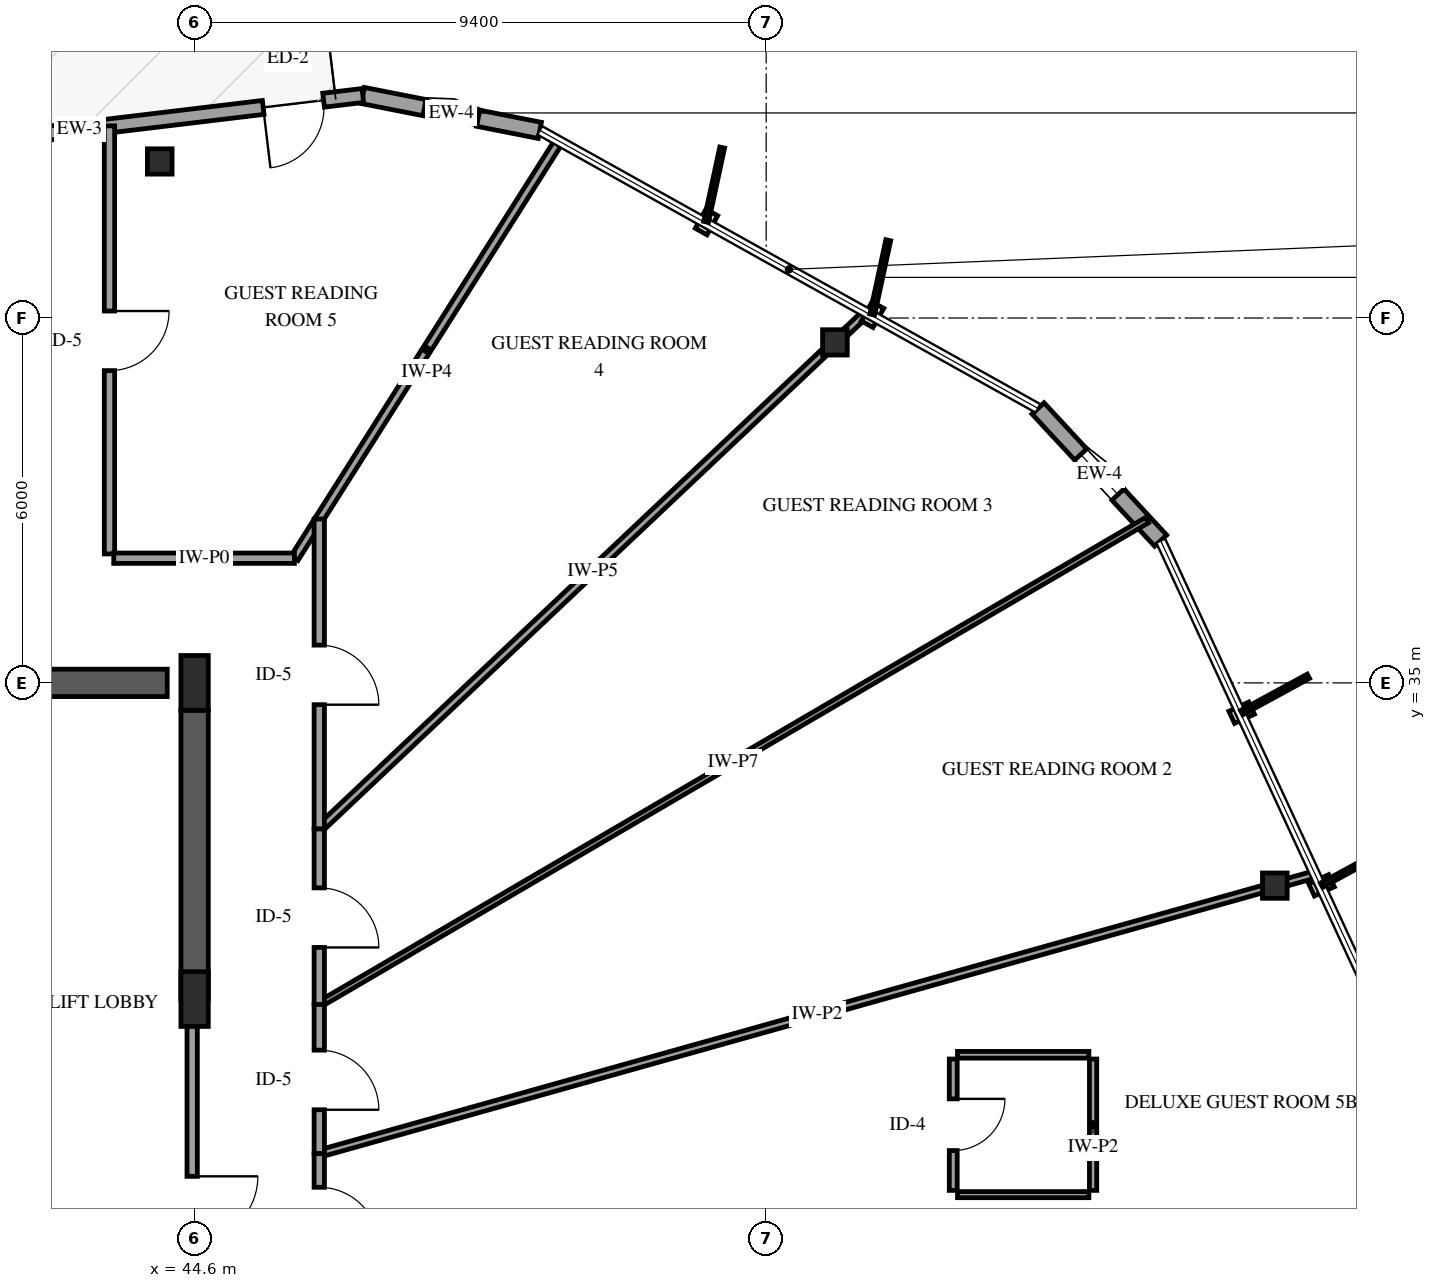
"""IFC4 building model, lengths in metres.
Left out: names, types, materials, properties, quantities, classifications, styles, units other than length and angle.
Written with IfcOpenShell. Run it as: python <this file> out.ifc"""

import sys

from ifc_helpers import new_model, si_unit, direction, frame, frame_2d, origin, origin_2d, place, context, subcontext, project, spatial, rectangle, i_section, extrude, element, fill, save


model = new_model("IFC4")
c1 = context("Model", 3, precision=1e-05, world=origin(), true_north=direction((0.0, 1.0)))
c2 = subcontext(c1, "Body", "Model", "MODEL_VIEW")
j1 = project(units=[si_unit("LENGTHUNIT", "METRE"), si_unit("PLANEANGLEUNIT", "RADIAN")], contexts=[c1])
p1 = place(None, origin())
s1 = spatial("IfcSite", under=j1, at=p1, CompositionType="ELEMENT")
p2 = place(p1, origin())
s2 = spatial("IfcBuilding", under=s1, at=p2, CompositionType="ELEMENT")
p3 = place(p2, frame((0.0, 0.0, 190.6)))
s3 = spatial("IfcBuildingStorey", under=s2, at=p3, CompositionType="ELEMENT", Elevation=190.6)
p4 = place(p3, frame((41.3, 35.0, 0.0), z_axis=(0.0, 0.0, 1.0), x_axis=(1.0, 0.0, 0.0)))
e1 = element("IfcWall", 1, at=p4, inside=s3, PredefinedType="SHEAR", context=c2, shape_type="SweptSolid", body=[
    extrude(rectangle(XDim=2.85, YDim=0.45, at=frame_2d((1.425, 0.0))), origin(), (0.0, 0.0, 1.0), 3.6),
])
p5 = place(p3, frame((44.6, 29.8, 0.0), z_axis=(0.0, 0.0, 1.0), x_axis=(0.0, 1.0, 0.0)))
e2 = element("IfcWall", 2, at=p5, inside=s3, PredefinedType="SHEAR", context=c2, shape_type="SweptSolid", body=[
    extrude(rectangle(XDim=4.75, YDim=0.45, at=frame_2d((2.375, 0.0))), origin(), (0.0, 0.0, 1.0), 3.6),
])
for number, where, z_axis, x_axis in (
    (3, (44.6, 29.8, -0.3), (0.0, 0.0, 1.0), (1.0, 0.0, 0.0)),
    (4, (44.6, 35.0, -0.3), (0.0, 0.0, 1.0), (1.0, 0.0, 0.0)),
):
    element("IfcColumn", number, at=place(p3, frame(where, z_axis=z_axis, x_axis=x_axis)), inside=s3, PredefinedType="PILASTER", context=c2, shape_type="SweptSolid", body=[
        extrude(rectangle(XDim=0.45, YDim=0.9, at=origin_2d()), origin(), (0.0, 0.0, 1.0), 3.9),
    ])
for number, where, z_axis, x_axis in (
    (5, (62.365, 31.666, -0.3), (0.0, 0.0, 1.0), (1.0, 0.0, 0.0)),
    (6, (55.13, 40.599, -0.3), (0.0, 0.0, 1.0), (1.0, 0.0, 0.0)),
    (7, (44.027, 43.574, -0.3), (0.0, 0.0, 1.0), (1.0, 0.0, 0.0)),
):
    element("IfcColumn", number, at=place(p3, frame(where, z_axis=z_axis, x_axis=x_axis)), inside=s3, PredefinedType="COLUMN", context=c2, shape_type="SweptSolid", body=[
        extrude(i_section(OverallWidth=0.406, OverallDepth=0.416, WebThickness=0.03, FlangeThickness=0.048, FilletRadius=0.038, at=origin_2d()), origin(), (0.0, 0.0, 1.0), 3.9),
    ])
p6 = place(p3, frame((50.277, 44.085, 0.0), z_axis=(0.0, 0.0, 1.0), x_axis=(-0.981090069254, 0.193551739883, 0.0)))
e8 = element("IfcWall", 8, at=p6, inside=s3, PredefinedType="SOLIDWALL", context=c2, shape_type="SweptSolid", body=[
    extrude(rectangle(XDim=2.967, YDim=0.27, at=frame_2d((1.483, 0.0))), origin(), (0.0, 0.0, 1.0), 2.679),
])
p7 = place(p6, frame((1.033, 0.0, 0.75)))
e9 = element("IfcOpeningElement", 9, at=p7, cuts=e8, PredefinedType="OPENING", context=c2, shape_type="SweptSolid", body=[
    extrude(rectangle(XDim=0.9, YDim=1.5, at=frame_2d((0.45, 0.75))), frame((0.0, 0.145, 0.0), z_axis=(0.0, -1.0, 0.0), x_axis=(1.0, 0.0, 0.0)), (0.0, 0.0, 1.0), 0.29),
])
p8 = place(p3, frame((47.366, 44.659, 0.0), z_axis=(0.0, 0.0, 1.0), x_axis=(-0.992882132133, -0.119101098615, 0.0)))
e10 = element("IfcWall", 10, at=p8, inside=s3, PredefinedType="SOLIDWALL", context=c2, shape_type="SweptSolid", body=[
    extrude(rectangle(XDim=9.382, YDim=0.23, at=frame_2d((4.691, 0.0))), origin(), (0.0, 0.0, 1.0), 2.679),
])
p9 = place(p8, frame((0.65, 0.0, 0.0)))
e11 = element("IfcOpeningElement", 11, at=p9, cuts=e10, PredefinedType="OPENING", context=c2, shape_type="SweptSolid", body=[
    extrude(rectangle(XDim=1.0, YDim=2.15, at=frame_2d((0.5, 1.075))), frame((0.0, 0.125, 0.0), z_axis=(0.0, -1.0, 0.0), x_axis=(1.0, 0.0, 0.0)), (0.0, 0.0, 1.0), 0.25),
])
p10 = place(p8, frame((6.583, 0.0, 0.72)))
e12 = element("IfcOpeningElement", 12, at=p10, cuts=e10, PredefinedType="OPENING", context=c2, shape_type="SweptSolid", body=[
    extrude(rectangle(XDim=1.5, YDim=1.7, at=frame_2d((0.75, 0.85))), frame((0.0, 0.125, 0.0), z_axis=(0.0, -1.0, 0.0), x_axis=(1.0, 0.0, 0.0)), (0.0, 0.0, 1.0), 0.25),
])
p11 = place(p3, frame((60.487, 37.339, 0.0), z_axis=(0.0, 0.0, 1.0), x_axis=(-0.679939563614, 0.733268156838, 0.0)))
e13 = element("IfcWall", 13, at=p11, inside=s3, PredefinedType="SOLIDWALL", context=c2, shape_type="SweptSolid", body=[
    extrude(rectangle(XDim=2.967, YDim=0.27, at=frame_2d((1.483, 0.0))), origin(), (0.0, 0.0, 1.0), 2.679),
])
p12 = place(p11, frame((1.033, 0.0, 0.75)))
e14 = element("IfcOpeningElement", 14, at=p12, cuts=e13, PredefinedType="OPENING", context=c2, shape_type="SweptSolid", body=[
    extrude(rectangle(XDim=0.9, YDim=1.5, at=frame_2d((0.45, 0.75))), frame((0.0, 0.145, 0.0), z_axis=(0.0, -1.0, 0.0), x_axis=(1.0, 0.0, 0.0)), (0.0, 0.0, 1.0), 0.29),
])
p13 = place(p3, frame((46.65, 27.258, 0.0), z_axis=(0.0, 0.0, 1.0), x_axis=(0.962850938161, 0.270033462525, 0.0)))
e15 = element("IfcWall", 15, at=p13, inside=s3, PredefinedType="PARTITIONING", context=c2, shape_type="SweptSolid", body=[
    extrude(rectangle(XDim=17.009, YDim=0.12, at=frame_2d((8.504, 0.0))), origin(), (0.0, 0.0, 1.0), 3.3),
])
p14 = place(p3, frame((46.65, 29.711, 0.0), z_axis=(0.0, 0.0, 1.0), x_axis=(0.863122930512, 0.504993868106, 0.0)))
e16 = element("IfcWall", 16, at=p14, inside=s3, PredefinedType="PARTITIONING", context=c2, shape_type="SweptSolid", body=[
    extrude(rectangle(XDim=15.771, YDim=0.1, at=frame_2d((7.885, 0.0))), origin(), (0.0, 0.0, 1.0), 2.678),
])
p15 = place(p3, frame((46.65, 32.597, 0.0), z_axis=(0.0, 0.0, 1.0), x_axis=(0.727340314182, 0.686276961121, 0.0)))
e17 = element("IfcWall", 17, at=p15, inside=s3, PredefinedType="PARTITIONING", context=c2, shape_type="SweptSolid", body=[
    extrude(rectangle(XDim=12.373, YDim=0.13, at=frame_2d((6.186, 0.0))), origin(), (0.0, 0.0, 1.0), 2.595),
])
p16 = place(p3, frame((46.241, 37.05, 0.0), z_axis=(0.0, 0.0, 1.0), x_axis=(0.535676911854, 0.844423025566, 0.0)))
e18 = element("IfcWall", 18, at=p16, inside=s3, PredefinedType="PARTITIONING", context=c2, shape_type="SweptSolid", body=[
    extrude(rectangle(XDim=8.123, YDim=0.14, at=frame_2d((4.061, 0.0))), origin(), (0.0, 0.0, 1.0), 3.3),
])
p17 = place(p3, frame((43.2, 44.16, 0.0), z_axis=(0.0, 0.0, 1.0), x_axis=(0.0, -1.0, 0.0)))
e19 = element("IfcWall", 19, at=p17, inside=s3, PredefinedType="PARTITIONING", context=c2, shape_type="SweptSolid", body=[
    extrude(rectangle(XDim=7.04, YDim=0.17, at=frame_2d((3.52, 0.0))), origin(), (0.0, 0.0, 1.0), 2.595),
])
p18 = place(p17, frame((3.045, 0.0, 0.0)))
e20 = element("IfcOpeningElement", 20, at=p18, cuts=e19, PredefinedType="OPENING", context=c2, shape_type="SweptSolid", body=[
    extrude(rectangle(XDim=0.98, YDim=2.15, at=frame_2d((0.49, 1.075))), frame((0.0, 0.095, 0.0), z_axis=(0.0, -1.0, 0.0), x_axis=(1.0, 0.0, 0.0)), (0.0, 0.0, 1.0), 0.19),
])
p19 = place(p3, frame((44.56, 29.8, 0.0), z_axis=(0.0, 0.0, 1.0), x_axis=(0.0, -1.0, 0.0)))
e21 = element("IfcWall", 21, at=p19, inside=s3, PredefinedType="PARTITIONING", context=c2, shape_type="SweptSolid", body=[
    extrude(rectangle(XDim=6.91, YDim=0.17, at=frame_2d((3.455, 0.0))), origin(), (0.0, 0.0, 1.0), 2.34),
])
p20 = place(p19, frame((2.915, 0.0, 0.0)))
e22 = element("IfcOpeningElement", 22, at=p20, cuts=e21, PredefinedType="OPENING", context=c2, shape_type="SweptSolid", body=[
    extrude(rectangle(XDim=1.08, YDim=2.15, at=frame_2d((0.54, 1.075))), frame((0.0, 0.095, 0.0), z_axis=(0.0, -1.0, 0.0), x_axis=(1.0, 0.0, 0.0)), (0.0, 0.0, 1.0), 0.19),
])
p21 = place(p3, frame((46.65, 37.695, 0.0), z_axis=(0.0, 0.0, 1.0), x_axis=(0.0, -1.0, 0.0)))
e23 = element("IfcWall", 23, at=p21, inside=s3, PredefinedType="PARTITIONING", context=c2, shape_type="SweptSolid", body=[
    extrude(rectangle(XDim=5.098, YDim=0.17, at=frame_2d((2.549, 0.0))), origin(), (0.0, 0.0, 1.0), 3.3),
])
p22 = place(p21, frame((2.074, 0.0, 0.0)))
e24 = element("IfcOpeningElement", 24, at=p22, cuts=e23, PredefinedType="OPENING", context=c2, shape_type="SweptSolid", body=[
    extrude(rectangle(XDim=0.98, YDim=2.15, at=frame_2d((0.49, 1.075))), frame((0.0, 0.095, 0.0), z_axis=(0.0, -1.0, 0.0), x_axis=(1.0, 0.0, 0.0)), (0.0, 0.0, 1.0), 0.19),
])
p23 = place(p3, frame((43.27, 37.05, 0.0), z_axis=(0.0, 0.0, 1.0), x_axis=(1.0, 0.0, 0.0)))
e25 = element("IfcWall", 25, at=p23, inside=s3, PredefinedType="PARTITIONING", context=c2, shape_type="SweptSolid", body=[
    extrude(rectangle(XDim=2.971, YDim=0.17, at=frame_2d((1.485, 0.0))), origin(), (0.0, 0.0, 1.0), 3.3),
])
p24 = place(p3, frame((46.65, 32.597, 0.0), z_axis=(0.0, 0.0, 1.0), x_axis=(0.0, -1.0, 0.0)))
e26 = element("IfcWall", 26, at=p24, inside=s3, PredefinedType="PARTITIONING", context=c2, shape_type="SweptSolid", body=[
    extrude(rectangle(XDim=2.886, YDim=0.17, at=frame_2d((1.443, 0.0))), origin(), (0.0, 0.0, 1.0), 3.3),
])
p25 = place(p24, frame((0.968, 0.0, 0.0)))
e27 = element("IfcOpeningElement", 27, at=p25, cuts=e26, PredefinedType="OPENING", context=c2, shape_type="SweptSolid", body=[
    extrude(rectangle(XDim=0.98, YDim=2.15, at=frame_2d((0.49, 1.075))), frame((0.0, 0.095, 0.0), z_axis=(0.0, -1.0, 0.0), x_axis=(1.0, 0.0, 0.0)), (0.0, 0.0, 1.0), 0.19),
])
p26 = place(p3, frame((46.65, 29.711, 0.0), z_axis=(0.0, 0.0, 1.0), x_axis=(0.0, -1.0, 0.0)))
e28 = element("IfcWall", 28, at=p26, inside=s3, PredefinedType="PARTITIONING", context=c2, shape_type="SweptSolid", body=[
    extrude(rectangle(XDim=2.453, YDim=0.17, at=frame_2d((1.227, 0.0))), origin(), (0.0, 0.0, 1.0), 3.3),
])
p27 = place(p26, frame((0.751, 0.0, 0.0)))
e29 = element("IfcOpeningElement", 29, at=p27, cuts=e28, PredefinedType="OPENING", context=c2, shape_type="SweptSolid", body=[
    extrude(rectangle(XDim=0.98, YDim=2.15, at=frame_2d((0.49, 1.075))), frame((0.0, 0.095, 0.0), z_axis=(0.0, -1.0, 0.0), x_axis=(1.0, 0.0, 0.0)), (0.0, 0.0, 1.0), 0.19),
])
p28 = place(p3, frame((57.076, 28.814, 0.0), z_axis=(0.0, 0.0, 1.0), x_axis=(0.0, -1.0, 0.0)))
e30 = element("IfcWall", 30, at=p28, inside=s3, PredefinedType="PARTITIONING", context=c2, shape_type="SweptSolid", body=[
    extrude(rectangle(XDim=2.16, YDim=0.13, at=frame_2d((1.08, 0.0))), origin(), (0.0, 0.0, 1.0), 3.3),
])
p29 = place(p28, frame((0.655, 0.0, 0.0)))
e31 = element("IfcOpeningElement", 31, at=p29, cuts=e30, PredefinedType="OPENING", context=c2, shape_type="SweptSolid", body=[
    extrude(rectangle(XDim=0.85, YDim=2.1, at=frame_2d((0.425, 1.05))), frame((0.0, 0.075, 0.0), z_axis=(0.0, -1.0, 0.0), x_axis=(1.0, 0.0, 0.0)), (0.0, 0.0, 1.0), 0.15),
])
p30 = place(p3, frame((59.376, 26.654, 0.0), z_axis=(0.0, 0.0, 1.0), x_axis=(0.0, 1.0, 0.0)))
e32 = element("IfcWall", 32, at=p30, inside=s3, PredefinedType="PARTITIONING", context=c2, shape_type="SweptSolid", body=[
    extrude(rectangle(XDim=2.16, YDim=0.12, at=frame_2d((1.08, 0.0))), origin(), (0.0, 0.0, 1.0), 3.3),
])
p31 = place(p3, frame((59.306, 28.884, 0.0), z_axis=(0.0, 0.0, 1.0), x_axis=(-1.0, 0.0, 0.0)))
e33 = element("IfcWall", 33, at=p31, inside=s3, PredefinedType="PARTITIONING", context=c2, shape_type="SweptSolid", body=[
    extrude(rectangle(XDim=2.16, YDim=0.11, at=frame_2d((1.08, 0.0))), origin(), (0.0, 0.0, 1.0), 3.3),
])
p32 = place(p3, frame((57.146, 26.584, 0.0), z_axis=(0.0, 0.0, 1.0), x_axis=(1.0, 0.0, 0.0)))
e34 = element("IfcWall", 34, at=p32, inside=s3, PredefinedType="PARTITIONING", context=c2, shape_type="SweptSolid", body=[
    extrude(rectangle(XDim=2.16, YDim=0.1, at=frame_2d((1.08, 0.0))), origin(), (0.0, 0.0, 1.0), 3.3),
])
p33 = place(p3, frame((46.65, 27.258, 0.0), z_axis=(0.0, 0.0, 1.0), x_axis=(0.0, -1.0, 0.0)))
e35 = element("IfcWall", 35, at=p33, inside=s3, PredefinedType="PARTITIONING", context=c2, shape_type="SweptSolid", body=[
    extrude(rectangle(XDim=2.056, YDim=0.17, at=frame_2d((1.028, 0.0))), origin(), (0.0, 0.0, 1.0), 3.3),
])
p34 = place(p33, frame((0.553, 0.0, 0.0)))
e36 = element("IfcOpeningElement", 36, at=p34, cuts=e35, PredefinedType="OPENING", context=c2, shape_type="SweptSolid", body=[
    extrude(rectangle(XDim=0.98, YDim=2.15, at=frame_2d((0.49, 1.075))), frame((0.0, 0.095, 0.0), z_axis=(0.0, -1.0, 0.0), x_axis=(1.0, 0.0, 0.0)), (0.0, 0.0, 1.0), 0.19),
])
p35 = place(p7, origin())
e37 = element("IfcWindow", 37, at=p35, inside=s3, PartitioningType="SINGLE_PANEL", PredefinedType="WINDOW", context=c2, shape_type="SweptSolid", body=[
    extrude(rectangle(XDim=0.9, YDim=1.5, at=frame_2d((0.45, 0.75))), frame((0.0, 0.03, 0.0), z_axis=(0.0, -1.0, 0.0), x_axis=(1.0, 0.0, 0.0)), (0.0, 0.0, 1.0), 0.06),
])
fill(e9, e37)
p36 = place(p9, origin())
e38 = element("IfcDoor", 38, at=p36, inside=s3, OperationType="SINGLE_SWING_RIGHT", PredefinedType="DOOR", context=c2, shape_type="SweptSolid", body=[
    extrude(rectangle(XDim=1.0, YDim=2.15, at=frame_2d((0.5, 1.075))), frame((0.0, 0.025, 0.0), z_axis=(0.0, -1.0, 0.0), x_axis=(1.0, 0.0, 0.0)), (0.0, 0.0, 1.0), 0.05),
])
fill(e11, e38)
p37 = place(p12, origin())
e39 = element("IfcWindow", 39, at=p37, inside=s3, PartitioningType="SINGLE_PANEL", PredefinedType="WINDOW", context=c2, shape_type="SweptSolid", body=[
    extrude(rectangle(XDim=0.9, YDim=1.5, at=frame_2d((0.45, 0.75))), frame((0.0, 0.03, 0.0), z_axis=(0.0, -1.0, 0.0), x_axis=(1.0, 0.0, 0.0)), (0.0, 0.0, 1.0), 0.06),
])
fill(e14, e39)
p38 = place(p18, origin())
e40 = element("IfcDoor", 40, at=p38, inside=s3, OperationType="SINGLE_SWING_LEFT", PredefinedType="DOOR", context=c2, shape_type="SweptSolid", body=[
    extrude(rectangle(XDim=0.98, YDim=2.15, at=frame_2d((0.49, 1.075))), frame((0.0, 0.025, 0.0), z_axis=(0.0, -1.0, 0.0), x_axis=(1.0, 0.0, 0.0)), (0.0, 0.0, 1.0), 0.05),
])
fill(e20, e40)
p39 = place(p20, origin())
e41 = element("IfcDoor", 41, at=p39, inside=s3, OperationType="SINGLE_SWING_LEFT", PredefinedType="DOOR", context=c2, shape_type="SweptSolid", body=[
    extrude(rectangle(XDim=1.08, YDim=2.15, at=frame_2d((0.54, 1.075))), frame((0.0, 0.025, 0.0), z_axis=(0.0, -1.0, 0.0), x_axis=(1.0, 0.0, 0.0)), (0.0, 0.0, 1.0), 0.05),
])
fill(e22, e41)
p40 = place(p22, origin())
e42 = element("IfcDoor", 42, at=p40, inside=s3, OperationType="SINGLE_SWING_RIGHT", PredefinedType="DOOR", context=c2, shape_type="SweptSolid", body=[
    extrude(rectangle(XDim=0.98, YDim=2.15, at=frame_2d((0.49, 1.075))), frame((0.0, 0.025, 0.0), z_axis=(0.0, -1.0, 0.0), x_axis=(1.0, 0.0, 0.0)), (0.0, 0.0, 1.0), 0.05),
])
fill(e24, e42)
p41 = place(p25, origin())
e43 = element("IfcDoor", 43, at=p41, inside=s3, OperationType="SINGLE_SWING_RIGHT", PredefinedType="DOOR", context=c2, shape_type="SweptSolid", body=[
    extrude(rectangle(XDim=0.98, YDim=2.15, at=frame_2d((0.49, 1.075))), frame((0.0, 0.025, 0.0), z_axis=(0.0, -1.0, 0.0), x_axis=(1.0, 0.0, 0.0)), (0.0, 0.0, 1.0), 0.05),
])
fill(e27, e43)
p42 = place(p27, origin())
e44 = element("IfcDoor", 44, at=p42, inside=s3, OperationType="SINGLE_SWING_RIGHT", PredefinedType="DOOR", context=c2, shape_type="SweptSolid", body=[
    extrude(rectangle(XDim=0.98, YDim=2.15, at=frame_2d((0.49, 1.075))), frame((0.0, 0.025, 0.0), z_axis=(0.0, -1.0, 0.0), x_axis=(1.0, 0.0, 0.0)), (0.0, 0.0, 1.0), 0.05),
])
fill(e29, e44)
p43 = place(p29, origin())
e45 = element("IfcDoor", 45, at=p43, inside=s3, OperationType="SINGLE_SWING_LEFT", PredefinedType="DOOR", context=c2, shape_type="SweptSolid", body=[
    extrude(rectangle(XDim=0.85, YDim=2.1, at=frame_2d((0.425, 1.05))), frame((0.0, 0.025, 0.0), z_axis=(0.0, -1.0, 0.0), x_axis=(1.0, 0.0, 0.0)), (0.0, 0.0, 1.0), 0.05),
])
fill(e31, e45)
p44 = place(p34, origin())
e46 = element("IfcDoor", 46, at=p44, inside=s3, OperationType="SINGLE_SWING_RIGHT", PredefinedType="DOOR", context=c2, shape_type="SweptSolid", body=[
    extrude(rectangle(XDim=0.98, YDim=2.15, at=frame_2d((0.49, 1.075))), frame((0.0, 0.025, 0.0), z_axis=(0.0, -1.0, 0.0), x_axis=(1.0, 0.0, 0.0)), (0.0, 0.0, 1.0), 0.05),
])
fill(e36, e46)
save(model, sys.argv[1])
